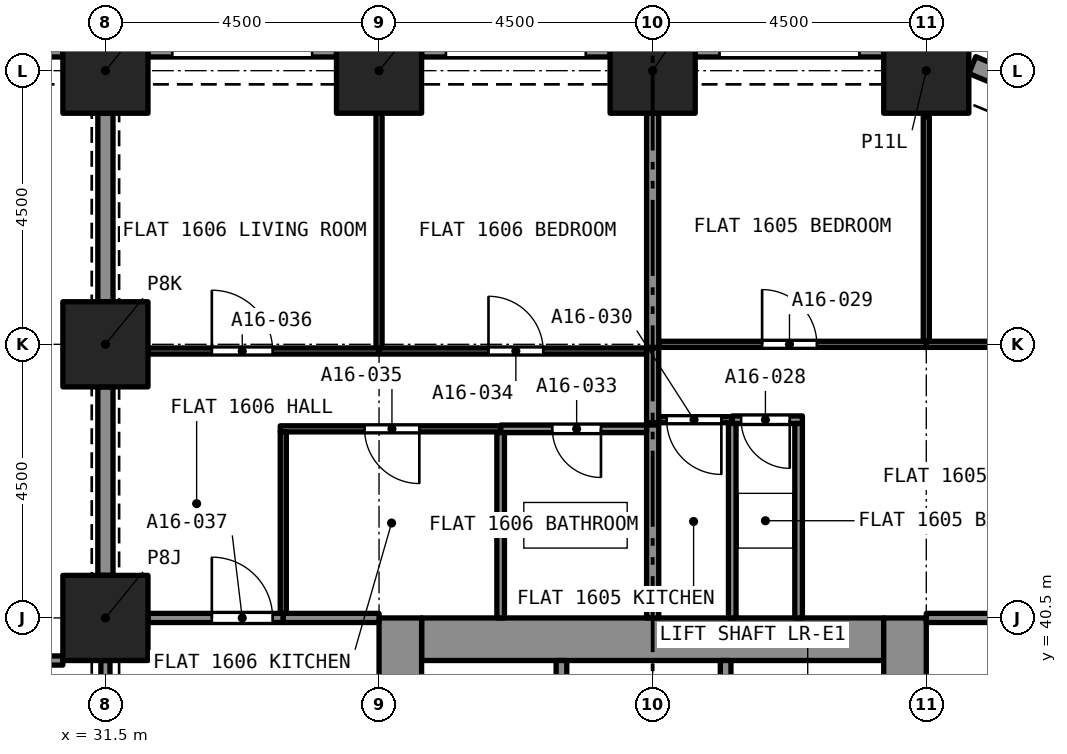
"""IFC4 building model, lengths in metres.
Left out: names, types, materials, properties, quantities, classifications, styles, units other than length and angle.
Written with IfcOpenShell. Run it as: python <this file> out.ifc"""

import sys

from ifc_helpers import new_model, si_unit, direction, frame, frame_2d, origin, origin_2d, place, context, subcontext, project, spatial, rectangle, extrude, element, fill, save


model = new_model("IFC4")
c1 = context("Model", 3, precision=1e-05, world=origin(), true_north=direction((0.0, 1.0)))
c2 = subcontext(c1, "Body", "Model", "MODEL_VIEW")
j1 = project(units=[si_unit("LENGTHUNIT", "METRE"), si_unit("PLANEANGLEUNIT", "RADIAN")], contexts=[c1])
p1 = place(None, origin())
s1 = spatial("IfcSite", under=j1, at=p1, CompositionType="ELEMENT")
p2 = place(p1, origin())
s2 = spatial("IfcBuilding", under=s1, at=p2, CompositionType="ELEMENT")
p3 = place(p2, frame((0.0, 0.0, 62.4)))
s3 = spatial("IfcBuildingStorey", under=s2, at=p3, CompositionType="ELEMENT", Elevation=62.4)
for number, where, z_axis, x_axis in (
    (1, (31.5, 40.5, 0.0), (0.0, 0.0, 1.0), (1.0, 0.0, 0.0)),
    (2, (31.5, 45.0, 0.0), (0.0, 0.0, 1.0), (1.0, 0.0, 0.0)),
    (3, (31.5, 49.5, 0.0), (0.0, 0.0, 1.0), (1.0, 0.0, 0.0)),
    (4, (36.0, 49.5, 0.0), (0.0, 0.0, 1.0), (1.0, 0.0, 0.0)),
    (5, (40.5, 49.5, 0.0), (0.0, 0.0, 1.0), (1.0, 0.0, 0.0)),
    (6, (45.0, 49.5, 0.0), (0.0, 0.0, 1.0), (1.0, 0.0, 0.0)),
):
    element("IfcColumn", number, at=place(p3, frame(where, z_axis=z_axis, x_axis=x_axis)), inside=s3, PredefinedType="COLUMN", context=c2, shape_type="SweptSolid", body=[
        extrude(rectangle(XDim=1.4, YDim=1.4, at=origin_2d()), origin(), (0.0, 0.0, 1.0), 3.2),
    ])
p4 = place(p3, frame((36.7, 40.15, 0.0), z_axis=(0.0, 0.0, 1.0), x_axis=(1.0, 0.0, 0.0)))
e7 = element("IfcWall", 7, at=p4, inside=s3, PredefinedType="SOLIDWALL", context=c2, shape_type="SweptSolid", body=[
    extrude(rectangle(XDim=7.6, YDim=0.7, at=frame_2d((3.8, 0.0))), origin(), (0.0, 0.0, 1.0), 3.2),
])
p5 = place(p3, frame((36.35, 27.0, 0.0), z_axis=(0.0, 0.0, 1.0), x_axis=(0.0, 1.0, 0.0)))
e8 = element("IfcWall", 8, at=p5, inside=s3, PredefinedType="SOLIDWALL", context=c2, shape_type="SweptSolid", body=[
    extrude(rectangle(XDim=13.5, YDim=0.7, at=frame_2d((6.75, 0.0))), origin(), (0.0, 0.0, 1.0), 3.2),
])
p6 = place(p5, frame((8.95, 0.0, 0.0)))
e9 = element("IfcOpeningElement", 9, at=p6, cuts=e8, PredefinedType="OPENING", context=c2, shape_type="SweptSolid", body=[
    extrude(rectangle(XDim=1.2, YDim=2.1, at=frame_2d((0.6, 1.05))), frame((0.0, 0.36, 0.0), z_axis=(0.0, -1.0, 0.0), x_axis=(1.0, 0.0, 0.0)), (0.0, 0.0, 1.0), 0.72),
])
p7 = place(p3, frame((44.65, 27.0, 0.0), z_axis=(0.0, 0.0, 1.0), x_axis=(0.0, 1.0, 0.0)))
e10 = element("IfcWall", 10, at=p7, inside=s3, PredefinedType="SOLIDWALL", context=c2, shape_type="SweptSolid", body=[
    extrude(rectangle(XDim=13.5, YDim=0.7, at=frame_2d((6.75, 0.0))), origin(), (0.0, 0.0, 1.0), 3.2),
])
p8 = place(p7, frame((8.95, 0.0, 0.0)))
e11 = element("IfcOpeningElement", 11, at=p8, cuts=e10, PredefinedType="OPENING", context=c2, shape_type="SweptSolid", body=[
    extrude(rectangle(XDim=1.2, YDim=2.1, at=frame_2d((0.6, 1.05))), frame((0.0, 0.36, 0.0), z_axis=(0.0, -1.0, 0.0), x_axis=(1.0, 0.0, 0.0)), (0.0, 0.0, 1.0), 0.72),
])
p9 = place(p3, frame((45.757, 49.592, 0.0), z_axis=(0.0, 0.0, 1.0), x_axis=(0.923857286003, -0.382737135771, 0.0)))
e12 = element("IfcWall", 12, at=p9, inside=s3, PredefinedType="SOLIDWALL", context=c2, shape_type="SweptSolid", body=[
    extrude(rectangle(XDim=1.865, YDim=0.3, at=frame_2d((0.933, 0.0))), origin(), (0.0, 0.0, 1.0), 3.2),
])
p10 = place(p9, frame((0.508, 0.0, 0.45)))
e13 = element("IfcOpeningElement", 13, at=p10, cuts=e12, PredefinedType="OPENING", context=c2, shape_type="SweptSolid", body=[
    extrude(rectangle(XDim=1.1, YDim=1.95, at=frame_2d((0.55, 0.975))), frame((0.0, 0.16, 0.0), z_axis=(0.0, -1.0, 0.0), x_axis=(1.0, 0.0, 0.0)), (0.0, 0.0, 1.0), 0.32),
])
p11 = place(p3, frame((41.2, 49.875, 0.0), z_axis=(0.0, 0.0, 1.0), x_axis=(1.0, 0.0, 0.0)))
e14 = element("IfcWall", 14, at=p11, inside=s3, PredefinedType="SOLIDWALL", context=c2, shape_type="SweptSolid", body=[
    extrude(rectangle(XDim=3.1, YDim=0.3, at=frame_2d((1.55, 0.0))), origin(), (0.0, 0.0, 1.0), 3.2),
])
p12 = place(p11, frame((0.4, 0.0, 0.45)))
e15 = element("IfcOpeningElement", 15, at=p12, cuts=e14, PredefinedType="OPENING", context=c2, shape_type="SweptSolid", body=[
    extrude(rectangle(XDim=2.3, YDim=1.95, at=frame_2d((1.15, 0.975))), frame((0.0, 0.16, 0.0), z_axis=(0.0, -1.0, 0.0), x_axis=(1.0, 0.0, 0.0)), (0.0, 0.0, 1.0), 0.32),
])
p13 = place(p3, frame((36.7, 49.875, 0.0), z_axis=(0.0, 0.0, 1.0), x_axis=(1.0, 0.0, 0.0)))
e16 = element("IfcWall", 16, at=p13, inside=s3, PredefinedType="SOLIDWALL", context=c2, shape_type="SweptSolid", body=[
    extrude(rectangle(XDim=3.1, YDim=0.3, at=frame_2d((1.55, 0.0))), origin(), (0.0, 0.0, 1.0), 3.2),
])
p14 = place(p13, frame((0.4, 0.0, 0.45)))
e17 = element("IfcOpeningElement", 17, at=p14, cuts=e16, PredefinedType="OPENING", context=c2, shape_type="SweptSolid", body=[
    extrude(rectangle(XDim=2.3, YDim=1.95, at=frame_2d((1.15, 0.975))), frame((0.0, 0.16, 0.0), z_axis=(0.0, -1.0, 0.0), x_axis=(1.0, 0.0, 0.0)), (0.0, 0.0, 1.0), 0.32),
])
p15 = place(p3, frame((32.2, 49.875, 0.0), z_axis=(0.0, 0.0, 1.0), x_axis=(1.0, 0.0, 0.0)))
e18 = element("IfcWall", 18, at=p15, inside=s3, PredefinedType="SOLIDWALL", context=c2, shape_type="SweptSolid", body=[
    extrude(rectangle(XDim=3.1, YDim=0.3, at=frame_2d((1.55, 0.0))), origin(), (0.0, 0.0, 1.0), 3.2),
])
p16 = place(p15, frame((0.4, 0.0, 0.45)))
e19 = element("IfcOpeningElement", 19, at=p16, cuts=e18, PredefinedType="OPENING", context=c2, shape_type="SweptSolid", body=[
    extrude(rectangle(XDim=2.3, YDim=1.95, at=frame_2d((1.15, 0.975))), frame((0.0, 0.16, 0.0), z_axis=(0.0, -1.0, 0.0), x_axis=(1.0, 0.0, 0.0)), (0.0, 0.0, 1.0), 0.32),
])
p17 = place(p3, frame((27.7, 49.875, 0.0), z_axis=(0.0, 0.0, 1.0), x_axis=(1.0, 0.0, 0.0)))
e20 = element("IfcWall", 20, at=p17, inside=s3, PredefinedType="SOLIDWALL", context=c2, shape_type="SweptSolid", body=[
    extrude(rectangle(XDim=3.1, YDim=0.3, at=frame_2d((1.55, 0.0))), origin(), (0.0, 0.0, 1.0), 3.2),
])
p18 = place(p17, frame((0.4, 0.0, 0.45)))
e21 = element("IfcOpeningElement", 21, at=p18, cuts=e20, PredefinedType="OPENING", context=c2, shape_type="SweptSolid", body=[
    extrude(rectangle(XDim=2.3, YDim=1.95, at=frame_2d((1.15, 0.975))), frame((0.0, 0.16, 0.0), z_axis=(0.0, -1.0, 0.0), x_axis=(1.0, 0.0, 0.0)), (0.0, 0.0, 1.0), 0.32),
])
p19 = place(p3, frame((42.962, 43.76, 0.0), z_axis=(0.0, 0.0, 1.0), x_axis=(-1.0, 0.0, 0.0)))
e22 = element("IfcWall", 22, at=p19, inside=s3, PredefinedType="PARTITIONING", context=c2, shape_type="SweptSolid", body=[
    extrude(rectangle(XDim=1.153, YDim=0.125, at=frame_2d((0.577, 0.0))), origin(), (0.0, 0.0, 1.0), 2.9),
])
p20 = place(p19, frame((0.208, 0.0, 0.0)))
e23 = element("IfcOpeningElement", 23, at=p20, cuts=e22, PredefinedType="OPENING", context=c2, shape_type="SweptSolid", body=[
    extrude(rectangle(XDim=0.8, YDim=2.1, at=frame_2d((0.4, 1.05))), frame((0.0, 0.073, 0.0), z_axis=(0.0, -1.0, 0.0), x_axis=(1.0, 0.0, 0.0)), (0.0, 0.0, 1.0), 0.145),
])
for number, where, z_axis, x_axis in (
    (24, (42.9, 40.5, 0.0), (0.0, 0.0, 1.0), (0.0, 1.0, 0.0)),
    (25, (41.809, 40.5, 0.0), (0.0, 0.0, 1.0), (0.0, 1.0, 0.0)),
):
    element("IfcWall", number, at=place(p3, frame(where, z_axis=z_axis, x_axis=x_axis)), inside=s3, PredefinedType="PARTITIONING", context=c2, shape_type="SweptSolid", body=[
        extrude(rectangle(XDim=3.198, YDim=0.125, at=frame_2d((1.599, 0.0))), origin(), (0.0, 0.0, 1.0), 2.9),
    ])
p21 = place(p3, frame((40.6, 45.0, 0.0), z_axis=(0.0, 0.0, 1.0), x_axis=(1.0, 0.0, 0.0)))
e26 = element("IfcWall", 26, at=p21, inside=s3, PredefinedType="PARTITIONING", context=c2, shape_type="SweptSolid", body=[
    extrude(rectangle(XDim=4.4, YDim=0.1, at=frame_2d((2.2, 0.0))), origin(), (0.0, 0.0, 1.0), 2.9),
])
p22 = place(p21, frame((1.7, 0.0, 0.0)))
e27 = element("IfcOpeningElement", 27, at=p22, cuts=e26, PredefinedType="OPENING", context=c2, shape_type="SweptSolid", body=[
    extrude(rectangle(XDim=0.9, YDim=2.1, at=frame_2d((0.45, 1.05))), frame((0.0, 0.06, 0.0), z_axis=(0.0, -1.0, 0.0), x_axis=(1.0, 0.0, 0.0)), (0.0, 0.0, 1.0), 0.12),
])
p23 = place(p3, frame((45.0, 45.05, 0.0), z_axis=(0.0, 0.0, 1.0), x_axis=(0.0, 1.0, 0.0)))
e28 = element("IfcWall", 28, at=p23, inside=s3, PredefinedType="PARTITIONING", context=c2, shape_type="SweptSolid", body=[
    extrude(rectangle(XDim=3.692, YDim=0.1, at=frame_2d((1.846, 0.0))), origin(), (0.0, 0.0, 1.0), 2.9),
])
p24 = place(p3, frame((40.5, 44.95, 0.0), z_axis=(0.0, 0.0, 1.0), x_axis=(0.0, 1.0, 0.0)))
e29 = element("IfcWall", 29, at=p24, inside=s3, PredefinedType="PARTITIONING", context=c2, shape_type="SweptSolid", body=[
    extrude(rectangle(XDim=3.85, YDim=0.2, at=frame_2d((1.925, 0.0))), origin(), (0.0, 0.0, 1.0), 2.9),
])
p25 = place(p3, frame((41.809, 43.76, 0.0), z_axis=(0.0, 0.0, 1.0), x_axis=(-1.0, 0.0, 0.0)))
e30 = element("IfcWall", 30, at=p25, inside=s3, PredefinedType="PARTITIONING", context=c2, shape_type="SweptSolid", body=[
    extrude(rectangle(XDim=1.209, YDim=0.1, at=frame_2d((0.604, 0.0))), origin(), (0.0, 0.0, 1.0), 2.9),
])
p26 = place(p25, frame((0.179, 0.0, 0.0)))
e31 = element("IfcOpeningElement", 31, at=p26, cuts=e30, PredefinedType="OPENING", context=c2, shape_type="SweptSolid", body=[
    extrude(rectangle(XDim=0.9, YDim=2.1, at=frame_2d((0.45, 1.05))), frame((0.0, 0.06, 0.0), z_axis=(0.0, -1.0, 0.0), x_axis=(1.0, 0.0, 0.0)), (0.0, 0.0, 1.0), 0.12),
])
p27 = place(p3, frame((45.0, 45.0, 0.0), z_axis=(0.0, 0.0, 1.0), x_axis=(1.0, 0.0, 0.0)))
e32 = element("IfcWall", 32, at=p27, inside=s3, PredefinedType="PARTITIONING", context=c2, shape_type="SweptSolid", body=[
    extrude(rectangle(XDim=3.742, YDim=0.1, at=frame_2d((1.871, 0.0))), origin(), (0.0, 0.0, 1.0), 2.9),
])
p28 = place(p27, frame((1.4, 0.0, 0.0)))
e33 = element("IfcOpeningElement", 33, at=p28, cuts=e32, PredefinedType="OPENING", context=c2, shape_type="SweptSolid", body=[
    extrude(rectangle(XDim=1.0, YDim=2.1, at=frame_2d((0.5, 1.05))), frame((0.0, 0.06, 0.0), z_axis=(0.0, -1.0, 0.0), x_axis=(1.0, 0.0, 0.0)), (0.0, 0.0, 1.0), 0.12),
])
p29 = place(p3, frame((40.5, 43.71, 0.0), z_axis=(0.0, 0.0, 1.0), x_axis=(0.0, 1.0, 0.0)))
e34 = element("IfcWall", 34, at=p29, inside=s3, PredefinedType="PARTITIONING", context=c2, shape_type="SweptSolid", body=[
    extrude(rectangle(XDim=1.23, YDim=0.2, at=frame_2d((0.615, 0.0))), origin(), (0.0, 0.0, 1.0), 2.9),
])
p30 = place(p3, frame((45.0, 40.5, 0.0), z_axis=(0.0, 0.0, 1.0), x_axis=(1.0, 0.0, 0.0)))
e35 = element("IfcWall", 35, at=p30, inside=s3, PredefinedType="PARTITIONING", context=c2, shape_type="SweptSolid", body=[
    extrude(rectangle(XDim=3.8, YDim=0.15, at=frame_2d((1.9, 0.0))), origin(), (0.0, 0.0, 1.0), 2.9),
])
p31 = place(p30, frame((1.75, 0.0, 0.0)))
e36 = element("IfcOpeningElement", 36, at=p31, cuts=e35, PredefinedType="OPENING", context=c2, shape_type="SweptSolid", body=[
    extrude(rectangle(XDim=1.0, YDim=2.1, at=frame_2d((0.5, 1.05))), frame((0.0, 0.085, 0.0), z_axis=(0.0, -1.0, 0.0), x_axis=(1.0, 0.0, 0.0)), (0.0, 0.0, 1.0), 0.17),
])
p32 = place(p3, frame((40.5, 40.5, 0.0), z_axis=(0.0, 0.0, 1.0), x_axis=(0.0, 1.0, 0.0)))
e37 = element("IfcWall", 37, at=p32, inside=s3, PredefinedType="PARTITIONING", context=c2, shape_type="SweptSolid", body=[
    extrude(rectangle(XDim=3.173, YDim=0.2, at=frame_2d((1.586, 0.0))), origin(), (0.0, 0.0, 1.0), 2.9),
])
p33 = place(p3, frame((40.4, 43.61, 0.0), z_axis=(0.0, 0.0, 1.0), x_axis=(-1.0, 0.0, 0.0)))
e38 = element("IfcWall", 38, at=p33, inside=s3, PredefinedType="PARTITIONING", context=c2, shape_type="SweptSolid", body=[
    extrude(rectangle(XDim=2.4, YDim=0.125, at=frame_2d((1.2, 0.0))), origin(), (0.0, 0.0, 1.0), 2.9),
])
p34 = place(p33, frame((0.75, 0.0, 0.0)))
e39 = element("IfcOpeningElement", 39, at=p34, cuts=e38, PredefinedType="OPENING", context=c2, shape_type="SweptSolid", body=[
    extrude(rectangle(XDim=0.8, YDim=2.1, at=frame_2d((0.4, 1.05))), frame((0.0, 0.073, 0.0), z_axis=(0.0, -1.0, 0.0), x_axis=(1.0, 0.0, 0.0)), (0.0, 0.0, 1.0), 0.145),
])
p35 = place(p3, frame((38.0, 40.5, 0.0), z_axis=(0.0, 0.0, 1.0), x_axis=(0.0, 1.0, 0.0)))
e40 = element("IfcWall", 40, at=p35, inside=s3, PredefinedType="PARTITIONING", context=c2, shape_type="SweptSolid", body=[
    extrude(rectangle(XDim=3.048, YDim=0.125, at=frame_2d((1.524, 0.0))), origin(), (0.0, 0.0, 1.0), 2.9),
])
p36 = place(p3, frame((36.0, 44.89, 0.0), z_axis=(0.0, 0.0, 1.0), x_axis=(1.0, 0.0, 0.0)))
e41 = element("IfcWall", 41, at=p36, inside=s3, PredefinedType="PARTITIONING", context=c2, shape_type="SweptSolid", body=[
    extrude(rectangle(XDim=4.4, YDim=0.1, at=frame_2d((2.2, 0.0))), origin(), (0.0, 0.0, 1.0), 2.9),
])
p37 = place(p36, frame((1.8, 0.0, 0.0)))
e42 = element("IfcOpeningElement", 42, at=p37, cuts=e41, PredefinedType="OPENING", context=c2, shape_type="SweptSolid", body=[
    extrude(rectangle(XDim=0.9, YDim=2.1, at=frame_2d((0.45, 1.05))), frame((0.0, 0.06, 0.0), z_axis=(0.0, -1.0, 0.0), x_axis=(1.0, 0.0, 0.0)), (0.0, 0.0, 1.0), 0.12),
])
p38 = place(p3, frame((36.0, 44.94, 0.0), z_axis=(0.0, 0.0, 1.0), x_axis=(0.0, 1.0, 0.0)))
e43 = element("IfcWall", 43, at=p38, inside=s3, PredefinedType="PARTITIONING", context=c2, shape_type="SweptSolid", body=[
    extrude(rectangle(XDim=3.86, YDim=0.1, at=frame_2d((1.93, 0.0))), origin(), (0.0, 0.0, 1.0), 2.9),
])
p39 = place(p3, frame((38.0, 43.61, 0.0), z_axis=(0.0, 0.0, 1.0), x_axis=(-1.0, 0.0, 0.0)))
e44 = element("IfcWall", 44, at=p39, inside=s3, PredefinedType="PARTITIONING", context=c2, shape_type="SweptSolid", body=[
    extrude(rectangle(XDim=3.625, YDim=0.1, at=frame_2d((1.812, 0.0))), origin(), (0.0, 0.0, 1.0), 2.9),
])
p40 = place(p39, frame((1.337, 0.0, 0.0)))
e45 = element("IfcOpeningElement", 45, at=p40, cuts=e44, PredefinedType="OPENING", context=c2, shape_type="SweptSolid", body=[
    extrude(rectangle(XDim=0.9, YDim=2.1, at=frame_2d((0.45, 1.05))), frame((0.0, 0.06, 0.0), z_axis=(0.0, -1.0, 0.0), x_axis=(1.0, 0.0, 0.0)), (0.0, 0.0, 1.0), 0.12),
])
p41 = place(p3, frame((34.425, 40.575, 0.0), z_axis=(0.0, 0.0, 1.0), x_axis=(0.0, 1.0, 0.0)))
e46 = element("IfcWall", 46, at=p41, inside=s3, PredefinedType="PARTITIONING", context=c2, shape_type="SweptSolid", body=[
    extrude(rectangle(XDim=2.985, YDim=0.1, at=frame_2d((1.493, 0.0))), origin(), (0.0, 0.0, 1.0), 2.9),
])
p42 = place(p3, frame((32.2, 44.89, 0.0), z_axis=(0.0, 0.0, 1.0), x_axis=(1.0, 0.0, 0.0)))
e47 = element("IfcWall", 47, at=p42, inside=s3, PredefinedType="PARTITIONING", context=c2, shape_type="SweptSolid", body=[
    extrude(rectangle(XDim=3.8, YDim=0.1, at=frame_2d((1.9, 0.0))), origin(), (0.0, 0.0, 1.0), 2.9),
])
p43 = place(p42, frame((1.05, 0.0, 0.0)))
e48 = element("IfcOpeningElement", 48, at=p43, cuts=e47, PredefinedType="OPENING", context=c2, shape_type="SweptSolid", body=[
    extrude(rectangle(XDim=1.0, YDim=2.1, at=frame_2d((0.5, 1.05))), frame((0.0, 0.06, 0.0), z_axis=(0.0, -1.0, 0.0), x_axis=(1.0, 0.0, 0.0)), (0.0, 0.0, 1.0), 0.12),
])
p44 = place(p3, frame((31.5, 41.2, 0.0), z_axis=(0.0, 0.0, 1.0), x_axis=(0.0, 1.0, 0.0)))
e49 = element("IfcWall", 49, at=p44, inside=s3, PredefinedType="PARTITIONING", context=c2, shape_type="SweptSolid", body=[
    extrude(rectangle(XDim=3.1, YDim=0.25, at=frame_2d((1.55, 0.0))), origin(), (0.0, 0.0, 1.0), 2.38),
])
p45 = place(p3, frame((32.2, 40.5, 0.0), z_axis=(0.0, 0.0, 1.0), x_axis=(1.0, 0.0, 0.0)))
e50 = element("IfcWall", 50, at=p45, inside=s3, PredefinedType="PARTITIONING", context=c2, shape_type="SweptSolid", body=[
    extrude(rectangle(XDim=2.225, YDim=0.15, at=frame_2d((1.113, 0.0))), origin(), (0.0, 0.0, 1.0), 2.9),
])
p46 = place(p45, frame((1.05, 0.0, 0.0)))
e51 = element("IfcOpeningElement", 51, at=p46, cuts=e50, PredefinedType="OPENING", context=c2, shape_type="SweptSolid", body=[
    extrude(rectangle(XDim=1.0, YDim=2.1, at=frame_2d((0.5, 1.05))), frame((0.0, 0.085, 0.0), z_axis=(0.0, -1.0, 0.0), x_axis=(1.0, 0.0, 0.0)), (0.0, 0.0, 1.0), 0.17),
])
p47 = place(p3, frame((34.425, 40.5, 0.0), z_axis=(0.0, 0.0, 1.0), x_axis=(1.0, 0.0, 0.0)))
e52 = element("IfcWall", 52, at=p47, inside=s3, PredefinedType="PARTITIONING", context=c2, shape_type="SweptSolid", body=[
    extrude(rectangle(XDim=1.575, YDim=0.15, at=frame_2d((0.788, 0.0))), origin(), (0.0, 0.0, 1.0), 2.9),
])
p48 = place(p3, frame((31.5, 45.7, 0.0), z_axis=(0.0, 0.0, 1.0), x_axis=(0.0, 1.0, 0.0)))
e53 = element("IfcWall", 53, at=p48, inside=s3, PredefinedType="PARTITIONING", context=c2, shape_type="SweptSolid", body=[
    extrude(rectangle(XDim=3.1, YDim=0.25, at=frame_2d((1.55, 0.0))), origin(), (0.0, 0.0, 1.0), 2.38),
])
p49 = place(p3, frame((27.0, 39.8, 0.0), z_axis=(0.0, 0.0, 1.0), x_axis=(1.0, 0.0, 0.0)))
e54 = element("IfcWall", 54, at=p49, inside=s3, PredefinedType="PARTITIONING", context=c2, shape_type="SweptSolid", body=[
    extrude(rectangle(XDim=3.8, YDim=0.15, at=frame_2d((1.9, 0.0))), origin(), (0.0, 0.0, 1.0), 2.75),
])
p50 = place(p49, frame((1.75, 0.0, 0.0)))
e55 = element("IfcOpeningElement", 55, at=p50, cuts=e54, PredefinedType="OPENING", context=c2, shape_type="SweptSolid", body=[
    extrude(rectangle(XDim=1.0, YDim=2.1, at=frame_2d((0.5, 1.05))), frame((0.0, 0.085, 0.0), z_axis=(0.0, -1.0, 0.0), x_axis=(1.0, 0.0, 0.0)), (0.0, 0.0, 1.0), 0.17),
])
p51 = place(p3, frame((31.5, 36.7, 0.0), z_axis=(0.0, 0.0, 1.0), x_axis=(0.0, 1.0, 0.0)))
e56 = element("IfcWall", 56, at=p51, inside=s3, PredefinedType="PARTITIONING", context=c2, shape_type="SweptSolid", body=[
    extrude(rectangle(XDim=3.1, YDim=0.15, at=frame_2d((1.55, 0.0))), origin(), (0.0, 0.0, 1.0), 2.38),
])
p52 = place(p51, frame((0.95, 0.0, 0.0)))
e57 = element("IfcOpeningElement", 57, at=p52, cuts=e56, PredefinedType="OPENING", context=c2, shape_type="SweptSolid", body=[
    extrude(rectangle(XDim=1.2, YDim=2.1, at=frame_2d((0.6, 1.05))), frame((0.0, 0.085, 0.0), z_axis=(0.0, -1.0, 0.0), x_axis=(1.0, 0.0, 0.0)), (0.0, 0.0, 1.0), 0.17),
])
for number, where, z_axis, x_axis in (
    (58, (41.7, 37.5, 0.0), (0.0, 0.0, 1.0), (0.0, 1.0, 0.0)),
    (59, (39.0, 37.5, 0.0), (0.0, 0.0, 1.0), (0.0, 1.0, 0.0)),
):
    element("IfcWall", number, at=place(p3, frame(where, z_axis=z_axis, x_axis=x_axis)), inside=s3, PredefinedType="SOLIDWALL", context=c2, shape_type="SweptSolid", body=[
        extrude(rectangle(XDim=2.3, YDim=0.175, at=frame_2d((1.15, 0.0))), origin(), (0.0, 0.0, 1.0), 2.9),
    ])
p53 = place(p20, origin())
e60 = element("IfcDoor", 60, at=p53, inside=s3, OperationType="SINGLE_SWING_RIGHT", PredefinedType="DOOR", context=c2, shape_type="SweptSolid", body=[
    extrude(rectangle(XDim=0.8, YDim=2.1, at=frame_2d((0.4, 1.05))), frame((0.0, 0.025, 0.0), z_axis=(0.0, -1.0, 0.0), x_axis=(1.0, 0.0, 0.0)), (0.0, 0.0, 1.0), 0.05),
])
fill(e23, e60)
p54 = place(p22, origin())
e61 = element("IfcDoor", 61, at=p54, inside=s3, OperationType="SINGLE_SWING_LEFT", PredefinedType="DOOR", context=c2, shape_type="SweptSolid", body=[
    extrude(rectangle(XDim=0.9, YDim=2.1, at=frame_2d((0.45, 1.05))), frame((0.0, 0.025, 0.0), z_axis=(0.0, -1.0, 0.0), x_axis=(1.0, 0.0, 0.0)), (0.0, 0.0, 1.0), 0.05),
])
fill(e27, e61)
p55 = place(p26, origin())
e62 = element("IfcDoor", 62, at=p55, inside=s3, OperationType="SINGLE_SWING_RIGHT", PredefinedType="DOOR", context=c2, shape_type="SweptSolid", body=[
    extrude(rectangle(XDim=0.9, YDim=2.1, at=frame_2d((0.45, 1.05))), frame((0.0, 0.025, 0.0), z_axis=(0.0, -1.0, 0.0), x_axis=(1.0, 0.0, 0.0)), (0.0, 0.0, 1.0), 0.05),
])
fill(e31, e62)
p56 = place(p34, origin())
e63 = element("IfcDoor", 63, at=p56, inside=s3, OperationType="SINGLE_SWING_LEFT", PredefinedType="DOOR", context=c2, shape_type="SweptSolid", body=[
    extrude(rectangle(XDim=0.8, YDim=2.1, at=frame_2d((0.4, 1.05))), frame((0.0, 0.025, 0.0), z_axis=(0.0, -1.0, 0.0), x_axis=(1.0, 0.0, 0.0)), (0.0, 0.0, 1.0), 0.05),
])
fill(e39, e63)
p57 = place(p37, origin())
e64 = element("IfcDoor", 64, at=p57, inside=s3, OperationType="SINGLE_SWING_RIGHT", PredefinedType="DOOR", context=c2, shape_type="SweptSolid", body=[
    extrude(rectangle(XDim=0.9, YDim=2.1, at=frame_2d((0.45, 1.05))), frame((0.0, 0.025, 0.0), z_axis=(0.0, -1.0, 0.0), x_axis=(1.0, 0.0, 0.0)), (0.0, 0.0, 1.0), 0.05),
])
fill(e42, e64)
p58 = place(p40, origin())
e65 = element("IfcDoor", 65, at=p58, inside=s3, OperationType="SINGLE_SWING_LEFT", PredefinedType="DOOR", context=c2, shape_type="SweptSolid", body=[
    extrude(rectangle(XDim=0.9, YDim=2.1, at=frame_2d((0.45, 1.05))), frame((0.0, 0.025, 0.0), z_axis=(0.0, -1.0, 0.0), x_axis=(1.0, 0.0, 0.0)), (0.0, 0.0, 1.0), 0.05),
])
fill(e45, e65)
p59 = place(p43, origin())
e66 = element("IfcDoor", 66, at=p59, inside=s3, OperationType="SINGLE_SWING_LEFT", PredefinedType="DOOR", context=c2, shape_type="SweptSolid", body=[
    extrude(rectangle(XDim=1.0, YDim=2.1, at=frame_2d((0.5, 1.05))), frame((0.0, 0.025, 0.0), z_axis=(0.0, -1.0, 0.0), x_axis=(1.0, 0.0, 0.0)), (0.0, 0.0, 1.0), 0.05),
])
fill(e48, e66)
p60 = place(p46, origin())
e67 = element("IfcDoor", 67, at=p60, inside=s3, OperationType="SINGLE_SWING_RIGHT", PredefinedType="DOOR", context=c2, shape_type="SweptSolid", body=[
    extrude(rectangle(XDim=1.0, YDim=2.1, at=frame_2d((0.5, 1.05))), frame((0.0, 0.025, 0.0), z_axis=(0.0, -1.0, 0.0), x_axis=(1.0, 0.0, 0.0)), (0.0, 0.0, 1.0), 0.05),
])
fill(e51, e67)
save(model, sys.argv[1])
